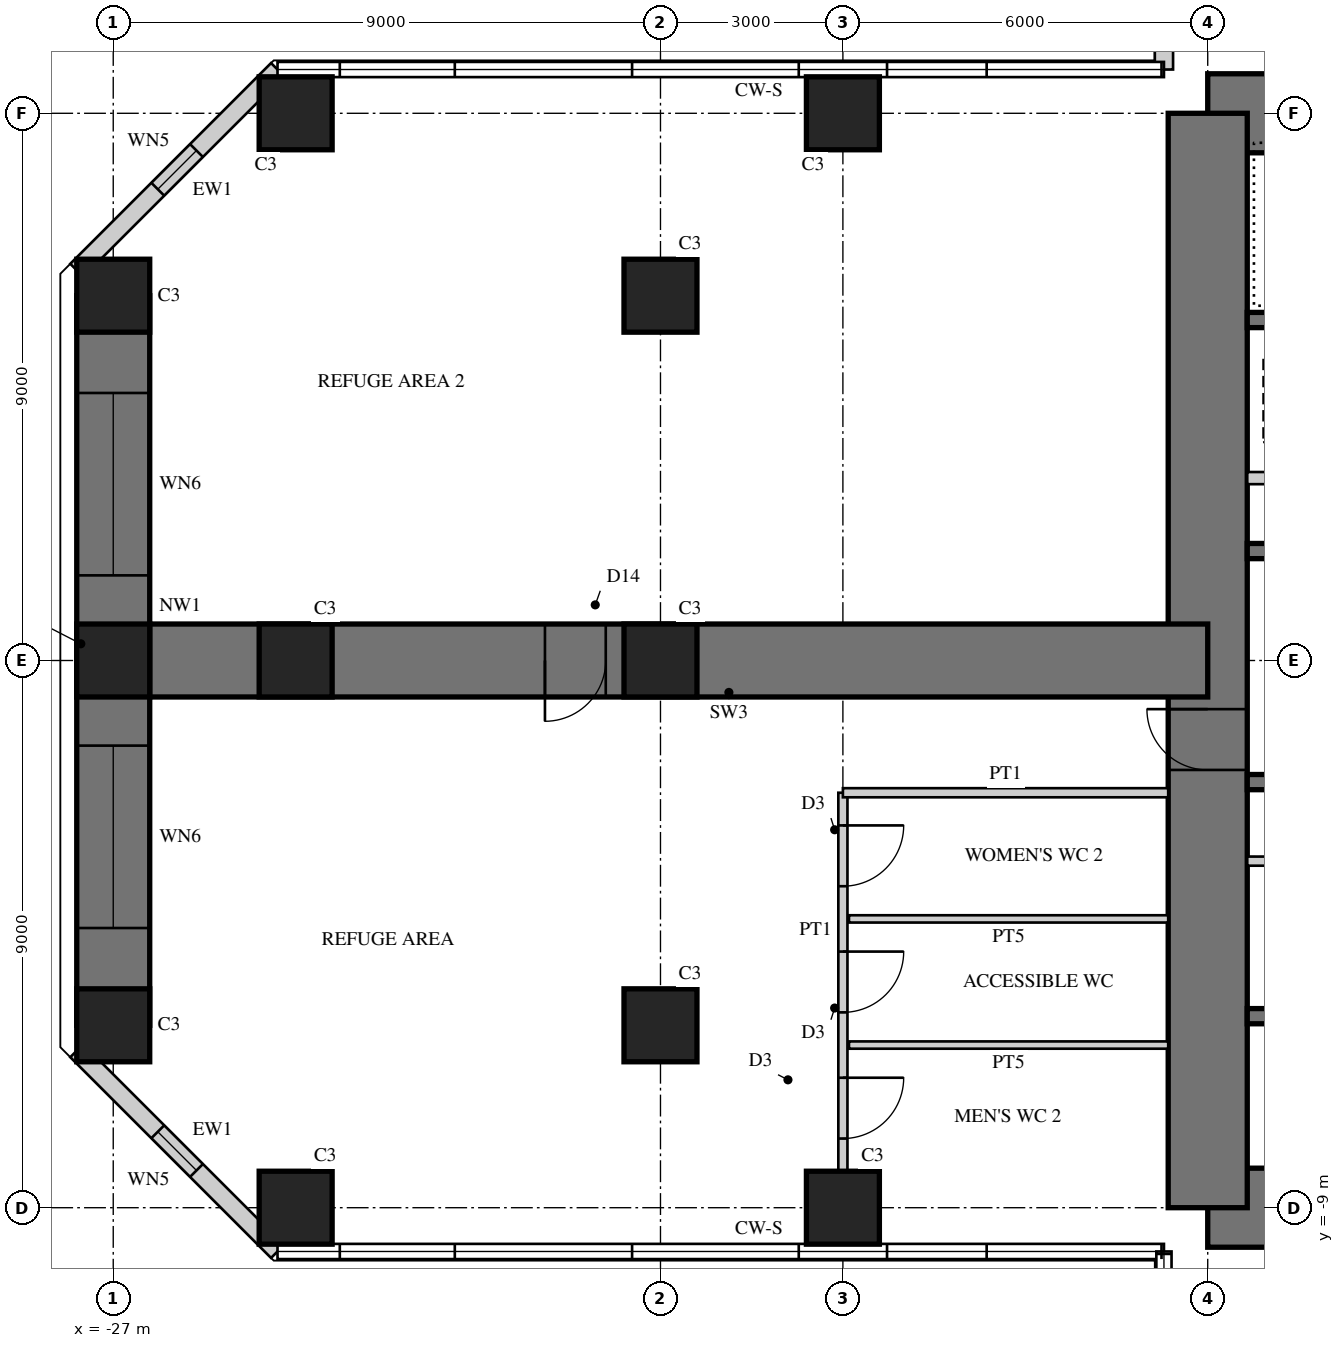
"""IFC4 building model, lengths in metres.
Left out: names, types, materials, properties, quantities, classifications, styles, units other than length and angle.
Written with IfcOpenShell. Run it as: python <this file> out.ifc"""

import sys

from ifc_helpers import new_model, si_unit, direction, frame, frame_2d, origin, origin_2d, place, context, subcontext, project, spatial, rectangle, hollow_rectangle, extrude, element, fill, save


model = new_model("IFC4")
c1 = context("Model", 3, precision=1e-05, world=origin(), true_north=direction((0.0, 1.0)))
c2 = subcontext(c1, "Body", "Model", "MODEL_VIEW")
j1 = project(units=[si_unit("LENGTHUNIT", "METRE"), si_unit("PLANEANGLEUNIT", "RADIAN")], contexts=[c1])
p1 = place(None, origin())
s1 = spatial("IfcSite", under=j1, at=p1, CompositionType="ELEMENT")
p2 = place(p1, origin())
s2 = spatial("IfcBuilding", under=s1, at=p2, CompositionType="ELEMENT")
p3 = place(p2, frame((0.0, 0.0, 95.5)))
s3 = spatial("IfcBuildingStorey", under=s2, at=p3, CompositionType="ELEMENT", Elevation=95.5)
p4 = place(p3, frame((9.0, 9.0, 0.0), z_axis=(0.0, 0.0, 1.0), x_axis=(-1.0, 0.0, 0.0)))
e1 = element("IfcWall", 1, at=p4, inside=s3, PredefinedType="SHEAR", context=c2, shape_type="SweptSolid", body=[
    extrude(rectangle(XDim=18.0, YDim=1.3, at=frame_2d((9.0, 0.0))), origin(), (0.0, 0.0, 1.0), 5.0),
])
p5 = place(p4, frame((9.8, 0.0, 0.0)))
e2 = element("IfcOpeningElement", 2, at=p5, cuts=e1, PredefinedType="OPENING", context=c2, shape_type="SweptSolid", body=[
    extrude(rectangle(XDim=1.0, YDim=2.4, at=frame_2d((0.5, 1.2))), frame((0.0, 0.66, 0.0), z_axis=(0.0, -1.0, 0.0), x_axis=(1.0, 0.0, 0.0)), (0.0, 0.0, 1.0), 1.32),
])
p6 = place(p3, frame((-9.0, -9.0, 0.0), z_axis=(0.0, 0.0, 1.0), x_axis=(1.0, 0.0, 0.0)))
e3 = element("IfcWall", 3, at=p6, inside=s3, PredefinedType="SHEAR", context=c2, shape_type="SweptSolid", body=[
    extrude(rectangle(XDim=18.0, YDim=1.3, at=frame_2d((9.0, 0.0))), origin(), (0.0, 0.0, 1.0), 5.0),
])
p7 = place(p6, frame((9.8, 0.0, 0.0)))
e4 = element("IfcOpeningElement", 4, at=p7, cuts=e3, PredefinedType="OPENING", context=c2, shape_type="SweptSolid", body=[
    extrude(rectangle(XDim=1.0, YDim=2.4, at=frame_2d((0.5, 1.2))), frame((0.0, 0.66, 0.0), z_axis=(0.0, -1.0, 0.0), x_axis=(1.0, 0.0, 0.0)), (0.0, 0.0, 1.0), 1.32),
])
p8 = place(p3, frame((-9.0, 9.0, 0.0), z_axis=(0.0, 0.0, 1.0), x_axis=(0.0, -1.0, 0.0)))
e5 = element("IfcWall", 5, at=p8, inside=s3, PredefinedType="SHEAR", context=c2, shape_type="SweptSolid", body=[
    extrude(rectangle(XDim=18.0, YDim=1.3, at=frame_2d((9.0, 0.0))), origin(), (0.0, 0.0, 1.0), 5.0),
])
p9 = place(p8, frame((9.8, 0.0, 0.0)))
e6 = element("IfcOpeningElement", 6, at=p9, cuts=e5, PredefinedType="OPENING", context=c2, shape_type="SweptSolid", body=[
    extrude(rectangle(XDim=1.0, YDim=2.4, at=frame_2d((0.5, 1.2))), frame((0.0, 0.66, 0.0), z_axis=(0.0, -1.0, 0.0), x_axis=(1.0, 0.0, 0.0)), (0.0, 0.0, 1.0), 1.32),
])
p10 = place(p3, frame((-2.125, 1.8, 0.0), z_axis=(0.0, 0.0, 1.0), x_axis=(-1.0, 0.0, 0.0)))
e7 = element("IfcWall", 7, at=p10, inside=s3, PredefinedType="SHEAR", context=c2, shape_type="SweptSolid", body=[
    extrude(rectangle(XDim=6.225, YDim=0.25, at=frame_2d((3.113, 0.0))), origin(), (0.0, 0.0, 1.0), 5.0),
])
p11 = place(p3, frame((-2.125, 5.6, 0.0), z_axis=(0.0, 0.0, 1.0), x_axis=(-1.0, 0.0, 0.0)))
e8 = element("IfcWall", 8, at=p11, inside=s3, PredefinedType="SHEAR", context=c2, shape_type="SweptSolid", body=[
    extrude(rectangle(XDim=6.225, YDim=0.25, at=frame_2d((3.113, 0.0))), origin(), (0.0, 0.0, 1.0), 5.0),
])
p12 = place(p11, frame((0.175, 0.0, 0.0)))
e9 = element("IfcOpeningElement", 9, at=p12, cuts=e8, PredefinedType="OPENING", context=c2, shape_type="SweptSolid", body=[
    extrude(rectangle(XDim=1.0, YDim=2.1, at=frame_2d((0.5, 1.05))), frame((0.0, 0.135, 0.0), z_axis=(0.0, -1.0, 0.0), x_axis=(1.0, 0.0, 0.0)), (0.0, 0.0, 1.0), 0.27),
])
p13 = place(p3, frame((-5.725, 3.0, 0.0), z_axis=(0.0, 0.0, 1.0), x_axis=(-1.0, 0.0, 0.0)))
e10 = element("IfcWall", 10, at=p13, inside=s3, PredefinedType="PARTITIONING", context=c2, shape_type="SweptSolid", body=[
    extrude(rectangle(XDim=2.625, YDim=0.2, at=frame_2d((1.312, 0.0))), origin(), (0.0, 0.0, 1.0), 5.0),
])
for number, where, z_axis, x_axis in (
    (11, (-1.925, -2.0, 0.0), (0.0, 0.0, 1.0), (-1.0, 0.0, 0.0)),
    (12, (-1.925, -5.85, 0.0), (0.0, 0.0, 1.0), (-1.0, 0.0, 0.0)),
):
    element("IfcWall", number, at=place(p3, frame(where, z_axis=z_axis, x_axis=x_axis)), inside=s3, PredefinedType="SHEAR", context=c2, shape_type="SweptSolid", body=[
        extrude(rectangle(XDim=6.425, YDim=0.25, at=frame_2d((3.212, 0.0))), origin(), (0.0, 0.0, 1.0), 5.0),
    ])
p14 = place(p3, frame((-1.925, -3.3, 0.0), z_axis=(0.0, 0.0, 1.0), x_axis=(-1.0, 0.0, 0.0)))
e13 = element("IfcWall", 13, at=p14, inside=s3, PredefinedType="PARTITIONING", context=c2, shape_type="SweptSolid", body=[
    extrude(rectangle(XDim=6.425, YDim=0.15, at=frame_2d((3.212, 0.0))), origin(), (0.0, 0.0, 1.0), 5.0),
])
p15 = place(p14, frame((0.075, 0.0, 0.0)))
e14 = element("IfcOpeningElement", 14, at=p15, cuts=e13, PredefinedType="OPENING", context=c2, shape_type="SweptSolid", body=[
    extrude(rectangle(XDim=0.8, YDim=2.1, at=frame_2d((0.4, 1.05))), frame((0.0, 0.085, 0.0), z_axis=(0.0, -1.0, 0.0), x_axis=(1.0, 0.0, 0.0)), (0.0, 0.0, 1.0), 0.17),
])
p16 = place(p14, frame((3.675, 0.0, 0.0)))
e15 = element("IfcOpeningElement", 15, at=p16, cuts=e13, PredefinedType="OPENING", context=c2, shape_type="SweptSolid", body=[
    extrude(rectangle(XDim=0.8, YDim=2.1, at=frame_2d((0.4, 1.05))), frame((0.0, 0.085, 0.0), z_axis=(0.0, -1.0, 0.0), x_axis=(1.0, 0.0, 0.0)), (0.0, 0.0, 1.0), 0.17),
])
p17 = place(p3, frame((-9.0, 0.0, 0.0), z_axis=(0.0, 0.0, 1.0), x_axis=(-1.0, 0.0, 0.0)))
e16 = element("IfcWall", 16, at=p17, inside=s3, PredefinedType="SHEAR", context=c2, shape_type="SweptSolid", body=[
    extrude(rectangle(XDim=18.0, YDim=1.2, at=frame_2d((9.0, 0.0))), origin(), (0.0, 0.0, 1.0), 5.0),
])
p18 = place(p17, frame((9.9, 0.0, 0.0)))
e17 = element("IfcOpeningElement", 17, at=p18, cuts=e16, PredefinedType="OPENING", context=c2, shape_type="SweptSolid", body=[
    extrude(rectangle(XDim=1.0, YDim=2.2, at=frame_2d((0.5, 1.1))), frame((0.0, 0.61, 0.0), z_axis=(0.0, -1.0, 0.0), x_axis=(1.0, 0.0, 0.0)), (0.0, 0.0, 1.0), 1.22),
])
p19 = place(p3, frame((-27.0, 6.0, 0.0), z_axis=(0.0, 0.0, 1.0), x_axis=(0.0, -1.0, 0.0)))
e18 = element("IfcWall", 18, at=p19, inside=s3, PredefinedType="SHEAR", context=c2, shape_type="SweptSolid", body=[
    extrude(rectangle(XDim=12.0, YDim=1.2, at=frame_2d((6.0, 0.0))), origin(), (0.0, 0.0, 1.0), 5.0),
])
p20 = place(p19, frame((1.6, 0.0, 0.6)))
e19 = element("IfcOpeningElement", 19, at=p20, cuts=e18, PredefinedType="OPENING", context=c2, shape_type="SweptSolid", body=[
    extrude(rectangle(XDim=3.0, YDim=2.4, at=frame_2d((1.5, 1.2))), frame((0.0, 0.61, 0.0), z_axis=(0.0, -1.0, 0.0), x_axis=(1.0, 0.0, 0.0)), (0.0, 0.0, 1.0), 1.22),
])
p21 = place(p19, frame((7.4, 0.0, 0.6)))
e20 = element("IfcOpeningElement", 20, at=p21, cuts=e18, PredefinedType="OPENING", context=c2, shape_type="SweptSolid", body=[
    extrude(rectangle(XDim=3.0, YDim=2.4, at=frame_2d((1.5, 1.2))), frame((0.0, 0.61, 0.0), z_axis=(0.0, -1.0, 0.0), x_axis=(1.0, 0.0, 0.0)), (0.0, 0.0, 1.0), 1.22),
])
for number, where, z_axis, x_axis in (
    (21, (-15.0, 9.0, 0.0), (0.0, 0.0, 1.0), (1.0, 0.0, 0.0)),
    (22, (-24.0, 9.0, 0.0), (0.0, 0.0, 1.0), (1.0, 0.0, 0.0)),
    (23, (-15.0, -9.0, 0.0), (0.0, 0.0, 1.0), (1.0, 0.0, 0.0)),
    (24, (-24.0, -9.0, 0.0), (0.0, 0.0, 1.0), (1.0, 0.0, 0.0)),
    (25, (-27.0, 6.0, 0.0), (0.0, 0.0, 1.0), (1.0, 0.0, 0.0)),
    (26, (-27.0, 0.0, 0.0), (0.0, 0.0, 1.0), (1.0, 0.0, 0.0)),
    (27, (-27.0, -6.0, 0.0), (0.0, 0.0, 1.0), (1.0, 0.0, 0.0)),
    (28, (-18.0, 6.0, 0.0), (0.0, 0.0, 1.0), (1.0, 0.0, 0.0)),
    (29, (-18.0, 0.0, 0.0), (0.0, 0.0, 1.0), (1.0, 0.0, 0.0)),
    (30, (-18.0, -6.0, 0.0), (0.0, 0.0, 1.0), (1.0, 0.0, 0.0)),
    (31, (-24.0, 0.0, 0.0), (0.0, 0.0, 1.0), (1.0, 0.0, 0.0)),
):
    element("IfcColumn", number, at=place(p3, frame(where, z_axis=z_axis, x_axis=x_axis)), inside=s3, PredefinedType="COLUMN", context=c2, shape_type="SweptSolid", body=[
        extrude(rectangle(XDim=1.2, YDim=1.2, at=origin_2d()), origin(), (0.0, 0.0, 1.0), 5.0),
    ])
p22 = place(p3, frame((-9.72, 24.298, 0.0), z_axis=(0.0, 0.0, 1.0), x_axis=(0.0, -1.0, 0.0)))
e32 = element("IfcWall", 32, at=p22, inside=s3, PredefinedType="SOLIDWALL", context=c2, shape_type="SweptSolid", body=[
    extrude(rectangle(XDim=14.578, YDim=0.3, at=frame_2d((7.289, 0.0))), origin(), (0.0, 0.0, 1.0), 4.8),
])
p23 = place(p3, frame((-24.298, 9.72, 0.0), z_axis=(0.0, 0.0, 1.0), x_axis=(-0.707106781187, -0.707106781187, 0.0)))
e33 = element("IfcWall", 33, at=p23, inside=s3, PredefinedType="SOLIDWALL", context=c2, shape_type="SweptSolid", body=[
    extrude(rectangle(XDim=4.669, YDim=0.3, at=frame_2d((2.335, 0.0))), origin(), (0.0, 0.0, 1.0), 4.8),
])
p24 = place(p23, frame((1.885, 0.0, 0.3)))
e34 = element("IfcOpeningElement", 34, at=p24, cuts=e33, PredefinedType="OPENING", context=c2, shape_type="SweptSolid", body=[
    extrude(rectangle(XDim=0.9, YDim=2.4, at=frame_2d((0.45, 1.2))), frame((0.0, 0.16, 0.0), z_axis=(0.0, -1.0, 0.0), x_axis=(1.0, 0.0, 0.0)), (0.0, 0.0, 1.0), 0.32),
])
p25 = place(p3, frame((-27.6, -6.418, 0.0), z_axis=(0.0, 0.0, 1.0), x_axis=(0.707106781187, -0.707106781187, 0.0)))
e35 = element("IfcWall", 35, at=p25, inside=s3, PredefinedType="SOLIDWALL", context=c2, shape_type="SweptSolid", body=[
    extrude(rectangle(XDim=4.669, YDim=0.3, at=frame_2d((2.335, 0.0))), origin(), (0.0, 0.0, 1.0), 4.8),
])
p26 = place(p25, frame((1.885, 0.0, 0.3)))
e36 = element("IfcOpeningElement", 36, at=p26, cuts=e35, PredefinedType="OPENING", context=c2, shape_type="SweptSolid", body=[
    extrude(rectangle(XDim=0.9, YDim=2.4, at=frame_2d((0.45, 1.2))), frame((0.0, 0.16, 0.0), z_axis=(0.0, -1.0, 0.0), x_axis=(1.0, 0.0, 0.0)), (0.0, 0.0, 1.0), 0.32),
])
p27 = place(p3, frame((-15.0, -2.175, 0.0), z_axis=(0.0, 0.0, 1.0), x_axis=(0.0, -1.0, 0.0)))
e37 = element("IfcWall", 37, at=p27, inside=s3, PredefinedType="PARTITIONING", context=c2, shape_type="SweptSolid", body=[
    extrude(rectangle(XDim=6.225, YDim=0.15, at=frame_2d((3.112, 0.0))), origin(), (0.0, 0.0, 1.0), 3.95),
])
p28 = place(p27, frame((0.538, 0.0, 0.0)))
e38 = element("IfcOpeningElement", 38, at=p28, cuts=e37, PredefinedType="OPENING", context=c2, shape_type="SweptSolid", body=[
    extrude(rectangle(XDim=1.0, YDim=2.1, at=frame_2d((0.5, 1.05))), frame((0.0, 0.085, 0.0), z_axis=(0.0, -1.0, 0.0), x_axis=(1.0, 0.0, 0.0)), (0.0, 0.0, 1.0), 0.17),
])
p29 = place(p27, frame((2.613, 0.0, 0.0)))
e39 = element("IfcOpeningElement", 39, at=p29, cuts=e37, PredefinedType="OPENING", context=c2, shape_type="SweptSolid", body=[
    extrude(rectangle(XDim=1.0, YDim=2.1, at=frame_2d((0.5, 1.05))), frame((0.0, 0.085, 0.0), z_axis=(0.0, -1.0, 0.0), x_axis=(1.0, 0.0, 0.0)), (0.0, 0.0, 1.0), 0.17),
])
p30 = place(p27, frame((4.688, 0.0, 0.0)))
e40 = element("IfcOpeningElement", 40, at=p30, cuts=e37, PredefinedType="OPENING", context=c2, shape_type="SweptSolid", body=[
    extrude(rectangle(XDim=1.0, YDim=2.1, at=frame_2d((0.5, 1.05))), frame((0.0, 0.085, 0.0), z_axis=(0.0, -1.0, 0.0), x_axis=(1.0, 0.0, 0.0)), (0.0, 0.0, 1.0), 0.17),
])
p31 = place(p3, frame((-9.65, -2.175, 0.0), z_axis=(0.0, 0.0, 1.0), x_axis=(-1.0, 0.0, 0.0)))
e41 = element("IfcWall", 41, at=p31, inside=s3, PredefinedType="PARTITIONING", context=c2, shape_type="SweptSolid", body=[
    extrude(rectangle(XDim=5.35, YDim=0.15, at=frame_2d((2.675, 0.0))), origin(), (0.0, 0.0, 1.0), 4.8),
])
for number, where, z_axis, x_axis in (
    (42, (-9.65, -4.25, 0.0), (0.0, 0.0, 1.0), (-1.0, 0.0, 0.0)),
    (43, (-9.65, -6.325, 0.0), (0.0, 0.0, 1.0), (-1.0, 0.0, 0.0)),
):
    element("IfcWall", number, at=place(p3, frame(where, z_axis=z_axis, x_axis=x_axis)), inside=s3, PredefinedType="PLUMBINGWALL", context=c2, shape_type="SweptSolid", body=[
        extrude(rectangle(XDim=5.25, YDim=0.12, at=frame_2d((2.625, 0.0))), origin(), (0.0, 0.0, 1.0), 4.8),
    ])
p32 = place(p24, origin())
e44 = element("IfcWindow", 44, at=p32, inside=s3, PartitioningType="SINGLE_PANEL", PredefinedType="WINDOW", context=c2, shape_type="SweptSolid", body=[
    extrude(hollow_rectangle(XDim=0.9, YDim=2.4, WallThickness=0.06, at=frame_2d((0.45, 1.2))), frame((0.0, 0.03, 0.0), z_axis=(0.0, -1.0, 0.0), x_axis=(1.0, 0.0, 0.0)), (0.0, 0.0, 1.0), 0.06),
    extrude(rectangle(XDim=0.779, YDim=2.279, at=frame_2d((0.45, 1.2))), frame((0.0, 0.03, 0.0), z_axis=(0.0, -1.0, 0.0), x_axis=(1.0, 0.0, 0.0)), (0.0, 0.0, 1.0), 0.06),
])
fill(e34, e44)
p33 = place(p20, origin())
e45 = element("IfcWindow", 45, at=p33, inside=s3, PartitioningType="SINGLE_PANEL", PredefinedType="WINDOW", context=c2, shape_type="SweptSolid", body=[
    extrude(hollow_rectangle(XDim=3.0, YDim=2.4, WallThickness=0.06, at=frame_2d((1.5, 1.2))), frame((0.0, 0.03, 0.0), z_axis=(0.0, -1.0, 0.0), x_axis=(1.0, 0.0, 0.0)), (0.0, 0.0, 1.0), 0.06),
    extrude(rectangle(XDim=2.879, YDim=2.279, at=frame_2d((1.5, 1.2))), frame((0.0, 0.03, 0.0), z_axis=(0.0, -1.0, 0.0), x_axis=(1.0, 0.0, 0.0)), (0.0, 0.0, 1.0), 0.06),
])
fill(e19, e45)
p34 = place(p21, origin())
e46 = element("IfcWindow", 46, at=p34, inside=s3, PartitioningType="SINGLE_PANEL", PredefinedType="WINDOW", context=c2, shape_type="SweptSolid", body=[
    extrude(hollow_rectangle(XDim=3.0, YDim=2.4, WallThickness=0.06, at=frame_2d((1.5, 1.2))), frame((0.0, 0.03, 0.0), z_axis=(0.0, -1.0, 0.0), x_axis=(1.0, 0.0, 0.0)), (0.0, 0.0, 1.0), 0.06),
    extrude(rectangle(XDim=2.879, YDim=2.279, at=frame_2d((1.5, 1.2))), frame((0.0, 0.03, 0.0), z_axis=(0.0, -1.0, 0.0), x_axis=(1.0, 0.0, 0.0)), (0.0, 0.0, 1.0), 0.06),
])
fill(e20, e46)
p35 = place(p26, origin())
e47 = element("IfcWindow", 47, at=p35, inside=s3, PartitioningType="SINGLE_PANEL", PredefinedType="WINDOW", context=c2, shape_type="SweptSolid", body=[
    extrude(hollow_rectangle(XDim=0.9, YDim=2.4, WallThickness=0.06, at=frame_2d((0.45, 1.2))), frame((0.0, 0.03, 0.0), z_axis=(0.0, -1.0, 0.0), x_axis=(1.0, 0.0, 0.0)), (0.0, 0.0, 1.0), 0.06),
    extrude(rectangle(XDim=0.779, YDim=2.279, at=frame_2d((0.45, 1.2))), frame((0.0, 0.03, 0.0), z_axis=(0.0, -1.0, 0.0), x_axis=(1.0, 0.0, 0.0)), (0.0, 0.0, 1.0), 0.06),
])
fill(e36, e47)
p36 = place(p28, origin())
e48 = element("IfcDoor", 48, at=p36, inside=s3, OperationType="SINGLE_SWING_LEFT", PredefinedType="DOOR", context=c2, shape_type="SweptSolid", body=[
    extrude(rectangle(XDim=1.0, YDim=2.1, at=frame_2d((0.5, 1.05))), frame((0.0, 0.025, 0.0), z_axis=(0.0, -1.0, 0.0), x_axis=(1.0, 0.0, 0.0)), (0.0, 0.0, 1.0), 0.05),
])
fill(e38, e48)
p37 = place(p29, origin())
e49 = element("IfcDoor", 49, at=p37, inside=s3, OperationType="SINGLE_SWING_LEFT", PredefinedType="DOOR", context=c2, shape_type="SweptSolid", body=[
    extrude(rectangle(XDim=1.0, YDim=2.1, at=frame_2d((0.5, 1.05))), frame((0.0, 0.025, 0.0), z_axis=(0.0, -1.0, 0.0), x_axis=(1.0, 0.0, 0.0)), (0.0, 0.0, 1.0), 0.05),
])
fill(e39, e49)
p38 = place(p30, origin())
e50 = element("IfcDoor", 50, at=p38, inside=s3, OperationType="SINGLE_SWING_LEFT", PredefinedType="DOOR", context=c2, shape_type="SweptSolid", body=[
    extrude(rectangle(XDim=1.0, YDim=2.1, at=frame_2d((0.5, 1.05))), frame((0.0, 0.025, 0.0), z_axis=(0.0, -1.0, 0.0), x_axis=(1.0, 0.0, 0.0)), (0.0, 0.0, 1.0), 0.05),
])
fill(e40, e50)
p39 = place(p18, origin())
e51 = element("IfcDoor", 51, at=p39, inside=s3, OperationType="SINGLE_SWING_RIGHT", PredefinedType="DOOR", context=c2, shape_type="SweptSolid", body=[
    extrude(rectangle(XDim=1.0, YDim=2.2, at=frame_2d((0.5, 1.1))), frame((0.0, 0.025, 0.0), z_axis=(0.0, -1.0, 0.0), x_axis=(1.0, 0.0, 0.0)), (0.0, 0.0, 1.0), 0.05),
])
fill(e17, e51)
p40 = place(p9, frame((1.0, 0.0, 0.0), z_axis=(0.0, 0.0, 1.0), x_axis=(-1.0, 0.0, 0.0)))
e52 = element("IfcDoor", 52, at=p40, inside=s3, OperationType="SINGLE_SWING_RIGHT", PredefinedType="DOOR", context=c2, shape_type="SweptSolid", body=[
    extrude(rectangle(XDim=1.0, YDim=2.4, at=frame_2d((0.5, 1.2))), frame((0.0, -0.005, 0.0), z_axis=(0.0, -1.0, 0.0), x_axis=(1.0, 0.0, 0.0)), (0.0, 0.0, 1.0), 0.05),
])
fill(e6, e52)
save(model, sys.argv[1])
